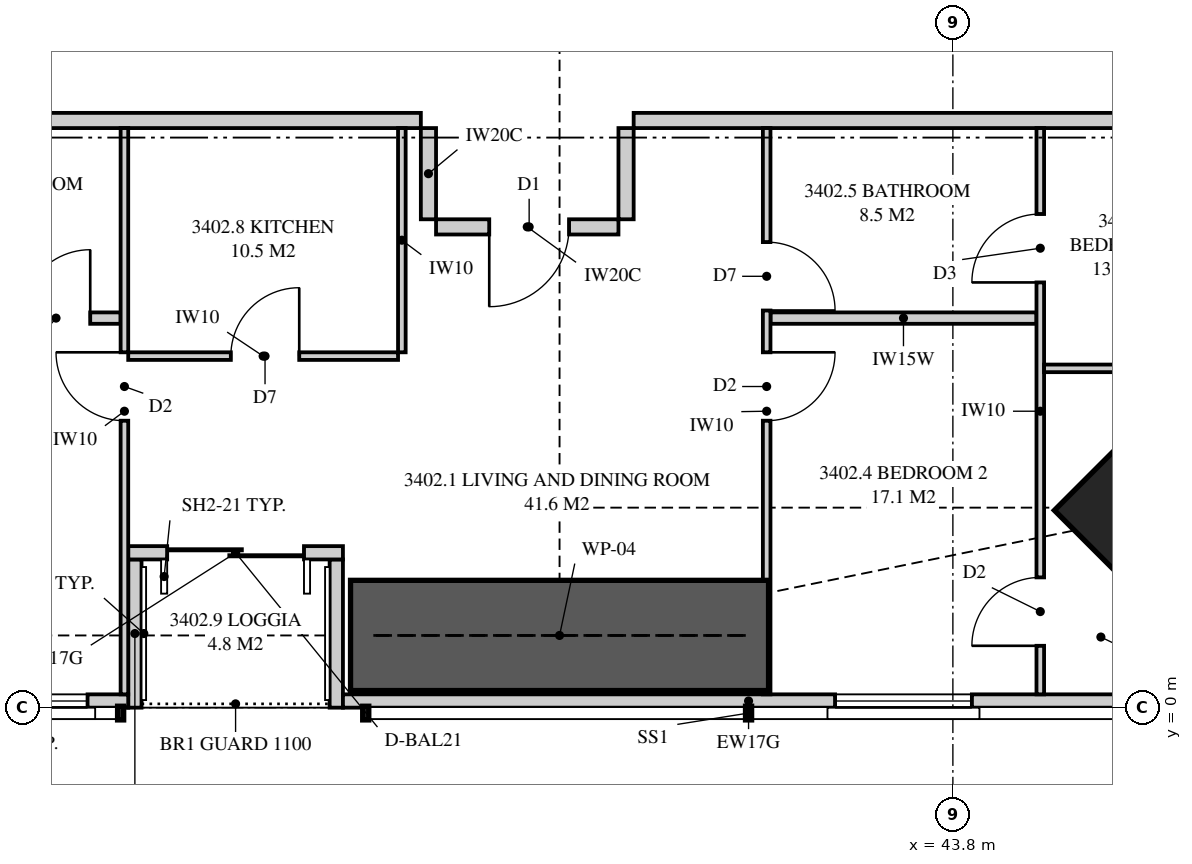
"""IFC4 building model, lengths in metres.
Left out: names, types, materials, properties, quantities, classifications, styles, units other than length and angle.
Written with IfcOpenShell. Run it as: python <this file> out.ifc"""

import sys

from ifc_helpers import new_model, si_unit, direction, frame, frame_2d, origin, origin_2d, place, context, subcontext, project, spatial, polyline, rectangle, outline, extrude, element, fill, save


model = new_model("IFC4")
c1 = context("Model", 3, precision=1e-05, world=origin(), true_north=direction((0.0, 1.0)))
c2 = subcontext(c1, "Body", "Model", "MODEL_VIEW")
j1 = project(units=[si_unit("LENGTHUNIT", "METRE"), si_unit("PLANEANGLEUNIT", "RADIAN")], contexts=[c1])
p1 = place(None, origin())
s1 = spatial("IfcSite", under=j1, at=p1, CompositionType="ELEMENT")
p2 = place(p1, origin())
s2 = spatial("IfcBuilding", under=s1, at=p2, CompositionType="ELEMENT")
p3 = place(p2, frame((0.0, 0.0, 124.95)))
s3 = spatial("IfcBuildingStorey", under=s2, at=p3, CompositionType="ELEMENT", Elevation=124.95)
p4 = place(p3, frame((46.869, 2.631, 0.0), z_axis=(0.0, 0.0, 1.0), x_axis=(-0.707106781187, 0.707106781187, 0.0)))
e1 = element("IfcColumn", 1, at=p4, inside=s3, PredefinedType="COLUMN", context=c2, shape_type="SweptSolid", body=[
    extrude(rectangle(XDim=2.4, YDim=2.5, at=origin_2d()), origin(), (0.0, 0.0, 1.0), 3.35),
])
p5 = place(p3, frame((22.55, 0.087, 0.0), z_axis=(0.0, 0.0, 1.0), x_axis=(1.0, 0.0, 0.0)))
e2 = element("IfcWall", 2, at=p5, inside=s3, PredefinedType="SOLIDWALL", context=c2, shape_type="SweptSolid", body=[
    extrude(rectangle(XDim=10.4, YDim=0.175, at=frame_2d((5.2, 0.0))), origin(), (0.0, 0.0, 1.0), 2.15),
])
p6 = place(p5, frame((0.532, 0.0, 0.4)))
e3 = element("IfcOpeningElement", 3, at=p6, cuts=e2, PredefinedType="OPENING", context=c2, shape_type="SweptSolid", body=[
    extrude(rectangle(XDim=1.8, YDim=1.7, at=frame_2d((0.9, 0.85))), frame((0.0, 0.097, 0.0), z_axis=(0.0, -1.0, 0.0), x_axis=(1.0, 0.0, 0.0)), (0.0, 0.0, 1.0), 0.195),
])
p7 = place(p5, frame((8.065, 0.0, 0.4)))
e4 = element("IfcOpeningElement", 4, at=p7, cuts=e2, PredefinedType="OPENING", context=c2, shape_type="SweptSolid", body=[
    extrude(rectangle(XDim=1.8, YDim=1.7, at=frame_2d((0.9, 0.85))), frame((0.0, 0.097, 0.0), z_axis=(0.0, -1.0, 0.0), x_axis=(1.0, 0.0, 0.0)), (0.0, 0.0, 1.0), 0.195),
])
p8 = place(p3, frame((35.775, 0.087, 0.0), z_axis=(0.0, 0.0, 1.0), x_axis=(1.0, 0.0, 0.0)))
e5 = element("IfcWall", 5, at=p8, inside=s3, PredefinedType="SOLIDWALL", context=c2, shape_type="SweptSolid", body=[
    extrude(outline(polyline([(0.0, 0.0), (10.674, 0.0), (10.674, 3.11), (3.053, 3.11), (3.053, 2.15), (3.008, 2.15), (3.008, 3.11), (2.85, 3.11), (2.85, 2.15), (0.0, 2.15), (0.0, 0.0)])), frame((0.0, 0.087, 0.0), z_axis=(0.0, -1.0, 0.0), x_axis=(1.0, 0.0, 0.0)), (0.0, 0.0, 1.0), 0.175),
])
p9 = place(p8, frame((6.475, 0.0, 0.4)))
e6 = element("IfcOpeningElement", 6, at=p9, cuts=e5, PredefinedType="OPENING", context=c2, shape_type="SweptSolid", body=[
    extrude(rectangle(XDim=1.8, YDim=1.7, at=frame_2d((0.9, 0.85))), frame((0.0, 0.097, 0.0), z_axis=(0.0, -1.0, 0.0), x_axis=(1.0, 0.0, 0.0)), (0.0, 0.0, 1.0), 0.195),
])
p10 = place(p3, frame((32.95, 2.038, 0.0), z_axis=(0.0, 0.0, 1.0), x_axis=(1.0, 0.0, 0.0)))
e7 = element("IfcWall", 7, at=p10, inside=s3, PredefinedType="SOLIDWALL", context=c2, shape_type="SweptSolid", body=[
    extrude(rectangle(XDim=2.825, YDim=0.175, at=frame_2d((1.413, 0.0))), origin(), (0.0, 0.0, 1.0), 3.11),
])
p11 = place(p10, frame((0.512, 0.0, 0.0)))
e8 = element("IfcOpeningElement", 8, at=p11, cuts=e7, PredefinedType="OPENING", context=c2, shape_type="SweptSolid", body=[
    extrude(rectangle(XDim=1.8, YDim=2.1, at=frame_2d((0.9, 1.05))), frame((0.0, 0.097, 0.0), z_axis=(0.0, -1.0, 0.0), x_axis=(1.0, 0.0, 0.0)), (0.0, 0.0, 1.0), 0.195),
])
for number, where, z_axis, x_axis in (
    (9, (33.038, 0.0, 0.0), (0.0, 0.0, 1.0), (0.0, 1.0, 0.0)),
    (10, (35.688, 0.0, 0.0), (0.0, 0.0, 1.0), (0.0, 1.0, 0.0)),
):
    element("IfcWall", number, at=place(p3, frame(where, z_axis=z_axis, x_axis=x_axis)), inside=s3, PredefinedType="SOLIDWALL", context=c2, shape_type="SweptSolid", body=[
        extrude(outline(polyline([(0.0, 0.0), (1.95, 0.0), (1.95, 3.11), (1.75, 3.11), (1.75, 2.15), (0.15, 2.15), (0.15, 3.11), (0.0, 3.11), (0.0, 0.0)])), frame((0.0, 0.087, 0.0), z_axis=(0.0, -1.0, 0.0), x_axis=(1.0, 0.0, 0.0)), (0.0, 0.0, 1.0), 0.175),
    ])
p12 = place(p3, frame((27.0, 7.725, 0.0), z_axis=(0.0, 0.0, 1.0), x_axis=(1.0, 0.0, 0.0)))
e11 = element("IfcWall", 11, at=p12, inside=s3, PredefinedType="PARTITIONING", context=c2, shape_type="SweptSolid", body=[
    extrude(outline(polyline([(0.0, 0.0), (9.8, 0.0), (9.8, 3.11), (1.087, 3.11), (1.087, 2.541), (0.413, 2.541), (0.413, 3.11), (0.0, 3.11), (0.0, 0.0)])), frame((0.0, 0.1, 0.0), z_axis=(0.0, -1.0, 0.0), x_axis=(1.0, 0.0, 0.0)), (0.0, 0.0, 1.0), 0.2),
])
p13 = place(p3, frame((32.9, 0.175, 0.0), z_axis=(0.0, 0.0, 1.0), x_axis=(0.0, 1.0, 0.0)))
e12 = element("IfcWall", 12, at=p13, inside=s3, PredefinedType="PARTITIONING", context=c2, shape_type="SweptSolid", body=[
    extrude(outline(polyline([(0.0, 0.0), (7.45, 0.0), (7.45, 3.11), (1.635, 3.11), (1.635, 2.15), (0.0, 2.15), (0.0, 3.11), (0.0, 0.0)])), frame((0.0, 0.05, 0.0), z_axis=(0.0, -1.0, 0.0), x_axis=(1.0, 0.0, 0.0)), (0.0, 0.0, 1.0), 0.1),
])
p14 = place(p13, frame((3.6, 0.0, 0.0)))
e13 = element("IfcOpeningElement", 13, at=p14, cuts=e12, PredefinedType="OPENING", context=c2, shape_type="SweptSolid", body=[
    extrude(rectangle(XDim=0.9, YDim=2.1, at=frame_2d((0.45, 1.05))), frame((0.0, 0.06, 0.0), z_axis=(0.0, -1.0, 0.0), x_axis=(1.0, 0.0, 0.0)), (0.0, 0.0, 1.0), 0.12),
])
p15 = place(p3, frame((41.35, 0.175, 0.0), z_axis=(0.0, 0.0, 1.0), x_axis=(0.0, 1.0, 0.0)))
e14 = element("IfcWall", 14, at=p15, inside=s3, PredefinedType="PARTITIONING", context=c2, shape_type="SweptSolid", body=[
    extrude(outline(polyline([(0.0, 0.0), (7.45, 0.0), (7.45, 3.11), (3.716, 3.11), (3.716, 2.51), (2.208, 2.51), (2.208, 2.15), (0.453, 2.15), (0.453, 3.11), (0.0, 3.11), (0.0, 0.0)])), frame((0.0, 0.05, 0.0), z_axis=(0.0, -1.0, 0.0), x_axis=(1.0, 0.0, 0.0)), (0.0, 0.0, 1.0), 0.1),
])
p16 = place(p15, frame((3.6, 0.0, 0.0)))
e15 = element("IfcOpeningElement", 15, at=p16, cuts=e14, PredefinedType="OPENING", context=c2, shape_type="SweptSolid", body=[
    extrude(rectangle(XDim=0.9, YDim=2.1, at=frame_2d((0.45, 1.05))), frame((0.0, 0.06, 0.0), z_axis=(0.0, -1.0, 0.0), x_axis=(1.0, 0.0, 0.0)), (0.0, 0.0, 1.0), 0.12),
])
p17 = place(p15, frame((5.05, 0.0, 0.0)))
e16 = element("IfcOpeningElement", 16, at=p17, cuts=e14, PredefinedType="OPENING", context=c2, shape_type="SweptSolid", body=[
    extrude(rectangle(XDim=0.9, YDim=2.1, at=frame_2d((0.45, 1.05))), frame((0.0, 0.06, 0.0), z_axis=(0.0, -1.0, 0.0), x_axis=(1.0, 0.0, 0.0)), (0.0, 0.0, 1.0), 0.12),
])
p18 = place(p3, frame((44.95, 0.175, 0.0), z_axis=(0.0, 0.0, 1.0), x_axis=(0.0, 1.0, 0.0)))
e17 = element("IfcWall", 17, at=p18, inside=s3, PredefinedType="PARTITIONING", context=c2, shape_type="SweptSolid", body=[
    extrude(outline(polyline([(0.0, 0.0), (7.45, 0.0), (7.45, 3.11), (3.716, 3.11), (3.716, 2.51), (2.943, 2.51), (2.943, 2.15), (1.188, 2.15), (1.188, 3.11), (0.0, 3.11), (0.0, 0.0)])), frame((0.0, 0.05, 0.0), z_axis=(0.0, -1.0, 0.0), x_axis=(1.0, 0.0, 0.0)), (0.0, 0.0, 1.0), 0.1),
])
p19 = place(p18, frame((0.639, 0.0, 0.0)))
e18 = element("IfcOpeningElement", 18, at=p19, cuts=e17, PredefinedType="OPENING", context=c2, shape_type="SweptSolid", body=[
    extrude(rectangle(XDim=0.9, YDim=2.1, at=frame_2d((0.45, 1.05))), frame((0.0, 0.06, 0.0), z_axis=(0.0, -1.0, 0.0), x_axis=(1.0, 0.0, 0.0)), (0.0, 0.0, 1.0), 0.12),
])
p20 = place(p18, frame((5.419, 0.0, 0.0)))
e19 = element("IfcOpeningElement", 19, at=p20, cuts=e17, PredefinedType="OPENING", context=c2, shape_type="SweptSolid", body=[
    extrude(rectangle(XDim=0.9, YDim=2.1, at=frame_2d((0.45, 1.05))), frame((0.0, 0.06, 0.0), z_axis=(0.0, -1.0, 0.0), x_axis=(1.0, 0.0, 0.0)), (0.0, 0.0, 1.0), 0.12),
])
p21 = place(p3, frame((27.0, 5.125, 0.0), z_axis=(0.0, 0.0, 1.0), x_axis=(1.0, 0.0, 0.0)))
e20 = element("IfcWall", 20, at=p21, inside=s3, PredefinedType="PLUMBINGWALL", context=c2, shape_type="SweptSolid", body=[
    extrude(outline(polyline([(0.0, 0.0), (5.85, 0.0), (5.85, 3.11), (1.062, 3.11), (1.062, 2.541), (0.438, 2.541), (0.438, 3.11), (0.0, 3.11), (0.0, 0.0)])), frame((0.0, 0.075, 0.0), z_axis=(0.0, -1.0, 0.0), x_axis=(1.0, 0.0, 0.0)), (0.0, 0.0, 1.0), 0.15),
])
p22 = place(p21, frame((4.55, 0.0, 0.0)))
e21 = element("IfcOpeningElement", 21, at=p22, cuts=e20, PredefinedType="OPENING", context=c2, shape_type="SweptSolid", body=[
    extrude(rectangle(XDim=0.9, YDim=2.1, at=frame_2d((0.45, 1.05))), frame((0.0, 0.085, 0.0), z_axis=(0.0, -1.0, 0.0), x_axis=(1.0, 0.0, 0.0)), (0.0, 0.0, 1.0), 0.17),
])
p23 = place(p3, frame((41.4, 5.125, 0.0), z_axis=(0.0, 0.0, 1.0), x_axis=(1.0, 0.0, 0.0)))
e22 = element("IfcWall", 22, at=p23, inside=s3, PredefinedType="PLUMBINGWALL", context=c2, shape_type="SweptSolid", body=[
    extrude(rectangle(XDim=3.5, YDim=0.15, at=frame_2d((1.75, 0.0))), origin(), (0.0, 0.0, 1.0), 3.11),
])
p24 = place(p3, frame((45.0, 4.464, 0.0), z_axis=(0.0, 0.0, 1.0), x_axis=(1.0, 0.0, 0.0)))
e23 = element("IfcWall", 23, at=p24, inside=s3, PredefinedType="PARTITIONING", context=c2, shape_type="SweptSolid", body=[
    extrude(outline(polyline([(0.0, 0.0), (4.5, 0.0), (4.5, 3.11), (3.037, 3.11), (3.037, 2.15), (1.294, 2.15), (1.294, 3.11), (0.0, 3.11), (0.0, 0.0)])), frame((0.0, 0.05, 0.0), z_axis=(0.0, -1.0, 0.0), x_axis=(1.0, 0.0, 0.0)), (0.0, 0.0, 1.0), 0.1),
])
p25 = place(p24, frame((2.9, 0.0, 0.0)))
e24 = element("IfcOpeningElement", 24, at=p25, cuts=e23, PredefinedType="OPENING", context=c2, shape_type="SweptSolid", body=[
    extrude(rectangle(XDim=0.9, YDim=2.1, at=frame_2d((0.45, 1.05))), frame((0.0, 0.06, 0.0), z_axis=(0.0, -1.0, 0.0), x_axis=(1.0, 0.0, 0.0)), (0.0, 0.0, 1.0), 0.12),
])
p26 = place(p3, frame((32.95, 4.625, 0.0), z_axis=(0.0, 0.0, 1.0), x_axis=(1.0, 0.0, 0.0)))
e25 = element("IfcWall", 25, at=p26, inside=s3, PredefinedType="PARTITIONING", context=c2, shape_type="SweptSolid", body=[
    extrude(rectangle(XDim=3.55, YDim=0.1, at=frame_2d((1.775, 0.0))), origin(), (0.0, 0.0, 1.0), 3.11),
])
p27 = place(p26, frame((1.35, 0.0, 0.0)))
e26 = element("IfcOpeningElement", 26, at=p27, cuts=e25, PredefinedType="OPENING", context=c2, shape_type="SweptSolid", body=[
    extrude(rectangle(XDim=0.9, YDim=2.1, at=frame_2d((0.45, 1.05))), frame((0.0, 0.06, 0.0), z_axis=(0.0, -1.0, 0.0), x_axis=(1.0, 0.0, 0.0)), (0.0, 0.0, 1.0), 0.12),
])
p28 = place(p3, frame((36.55, 4.675, 0.0), z_axis=(0.0, 0.0, 1.0), x_axis=(0.0, 1.0, 0.0)))
e27 = element("IfcWall", 27, at=p28, inside=s3, PredefinedType="PARTITIONING", context=c2, shape_type="SweptSolid", body=[
    extrude(rectangle(XDim=2.95, YDim=0.1, at=frame_2d((1.475, 0.0))), origin(), (0.0, 0.0, 1.0), 3.11),
])
p29 = place(p3, frame((39.6, 7.725, 0.0), z_axis=(0.0, 0.0, 1.0), x_axis=(1.0, 0.0, 0.0)))
e28 = element("IfcWall", 28, at=p29, inside=s3, PredefinedType="PARTITIONING", context=c2, shape_type="SweptSolid", body=[
    extrude(rectangle(XDim=6.425, YDim=0.2, at=frame_2d((3.212, 0.0))), origin(), (0.0, 0.0, 1.0), 3.11),
])
p30 = place(p3, frame((37.0, 6.325, 0.0), z_axis=(0.0, 0.0, 1.0), x_axis=(1.0, 0.0, 0.0)))
e29 = element("IfcWall", 29, at=p30, inside=s3, PredefinedType="PARTITIONING", context=c2, shape_type="SweptSolid", body=[
    extrude(outline(polyline([(0.0, 0.0), (2.4, 0.0), (2.4, 3.11), (1.962, 3.11), (1.962, 2.541), (1.288, 2.541), (1.288, 3.11), (0.0, 3.11), (0.0, 0.0)])), frame((0.0, 0.1, 0.0), z_axis=(0.0, -1.0, 0.0), x_axis=(1.0, 0.0, 0.0)), (0.0, 0.0, 1.0), 0.2),
])
p31 = place(p30, frame((0.7, 0.0, 0.0)))
e30 = element("IfcOpeningElement", 30, at=p31, cuts=e29, PredefinedType="OPENING", context=c2, shape_type="SweptSolid", body=[
    extrude(rectangle(XDim=1.05, YDim=2.2, at=frame_2d((0.525, 1.1))), frame((0.0, 0.11, 0.0), z_axis=(0.0, -1.0, 0.0), x_axis=(1.0, 0.0, 0.0)), (0.0, 0.0, 1.0), 0.22),
])
for number, where, z_axis, x_axis in (
    (31, (36.9, 7.625, 0.0), (0.0, 0.0, 1.0), (0.0, -1.0, 0.0)),
    (32, (39.5, 7.625, 0.0), (0.0, 0.0, 1.0), (0.0, -1.0, 0.0)),
):
    element("IfcWall", number, at=place(p3, frame(where, z_axis=z_axis, x_axis=x_axis)), inside=s3, PredefinedType="PARTITIONING", context=c2, shape_type="SweptSolid", body=[
        extrude(rectangle(XDim=1.2, YDim=0.2, at=frame_2d((0.6, 0.0))), origin(), (0.0, 0.0, 1.0), 3.11),
    ])
p32 = place(p3, frame((35.875, 0.95, 0.0), z_axis=(0.0, 0.0, 1.0), x_axis=(1.0, 0.0, 0.0)))
e33 = element("IfcWall", 33, at=p32, inside=s3, PredefinedType="SHEAR", context=c2, shape_type="SweptSolid", body=[
    extrude(rectangle(XDim=5.5, YDim=1.45, at=frame_2d((2.75, 0.0))), origin(), (0.0, 0.0, 1.0), 3.35),
])
p33 = place(p7, origin())
e34 = element("IfcWindow", 34, at=p33, inside=s3, PartitioningType="SINGLE_PANEL", PredefinedType="WINDOW", context=c2, shape_type="SweptSolid", body=[
    extrude(rectangle(XDim=1.8, YDim=1.7, at=frame_2d((0.9, 0.85))), frame((0.0, 0.03, 0.0), z_axis=(0.0, -1.0, 0.0), x_axis=(1.0, 0.0, 0.0)), (0.0, 0.0, 1.0), 0.06),
])
fill(e4, e34)
p34 = place(p11, origin())
e35 = element("IfcDoor", 35, at=p34, inside=s3, OperationType="SLIDING_TO_LEFT", PredefinedType="DOOR", context=c2, shape_type="SweptSolid", body=[
    extrude(rectangle(XDim=1.8, YDim=2.1, at=frame_2d((0.9, 1.05))), frame((0.0, 0.025, 0.0), z_axis=(0.0, -1.0, 0.0), x_axis=(1.0, 0.0, 0.0)), (0.0, 0.0, 1.0), 0.05),
])
fill(e8, e35)
p35 = place(p9, origin())
e36 = element("IfcWindow", 36, at=p35, inside=s3, PartitioningType="SINGLE_PANEL", PredefinedType="WINDOW", context=c2, shape_type="SweptSolid", body=[
    extrude(rectangle(XDim=1.8, YDim=1.7, at=frame_2d((0.9, 0.85))), frame((0.0, 0.03, 0.0), z_axis=(0.0, -1.0, 0.0), x_axis=(1.0, 0.0, 0.0)), (0.0, 0.0, 1.0), 0.06),
])
fill(e6, e36)
p36 = place(p31, frame((1.05, 0.0, 0.0), z_axis=(0.0, 0.0, 1.0), x_axis=(-1.0, 0.0, 0.0)))
e37 = element("IfcDoor", 37, at=p36, inside=s3, OperationType="SINGLE_SWING_RIGHT", PredefinedType="DOOR", context=c2, shape_type="SweptSolid", body=[
    extrude(rectangle(XDim=1.05, YDim=2.2, at=frame_2d((0.525, 1.1))), frame((0.0, 0.025, 0.0), z_axis=(0.0, -1.0, 0.0), x_axis=(1.0, 0.0, 0.0)), (0.0, 0.0, 1.0), 0.05),
])
fill(e30, e37)
p37 = place(p14, origin())
e38 = element("IfcDoor", 38, at=p37, inside=s3, OperationType="SINGLE_SWING_RIGHT", PredefinedType="DOOR", context=c2, shape_type="SweptSolid", body=[
    extrude(rectangle(XDim=0.9, YDim=2.1, at=frame_2d((0.45, 1.05))), frame((0.0, 0.025, 0.0), z_axis=(0.0, -1.0, 0.0), x_axis=(1.0, 0.0, 0.0)), (0.0, 0.0, 1.0), 0.05),
])
fill(e13, e38)
p38 = place(p22, origin())
e39 = element("IfcDoor", 39, at=p38, inside=s3, OperationType="SINGLE_SWING_RIGHT", PredefinedType="DOOR", context=c2, shape_type="SweptSolid", body=[
    extrude(rectangle(XDim=0.9, YDim=2.1, at=frame_2d((0.45, 1.05))), frame((0.0, 0.025, 0.0), z_axis=(0.0, -1.0, 0.0), x_axis=(1.0, 0.0, 0.0)), (0.0, 0.0, 1.0), 0.05),
])
fill(e21, e39)
p39 = place(p16, frame((0.9, 0.0, 0.0), z_axis=(0.0, 0.0, 1.0), x_axis=(-1.0, 0.0, 0.0)))
e40 = element("IfcDoor", 40, at=p39, inside=s3, OperationType="SINGLE_SWING_LEFT", PredefinedType="DOOR", context=c2, shape_type="SweptSolid", body=[
    extrude(rectangle(XDim=0.9, YDim=2.1, at=frame_2d((0.45, 1.05))), frame((0.0, 0.025, 0.0), z_axis=(0.0, -1.0, 0.0), x_axis=(1.0, 0.0, 0.0)), (0.0, 0.0, 1.0), 0.05),
])
fill(e15, e40)
p40 = place(p17, frame((0.9, 0.0, 0.0), z_axis=(0.0, 0.0, 1.0), x_axis=(-1.0, 0.0, 0.0)))
e41 = element("IfcDoor", 41, at=p40, inside=s3, OperationType="SINGLE_SWING_RIGHT", PredefinedType="DOOR", context=c2, shape_type="SweptSolid", body=[
    extrude(rectangle(XDim=0.9, YDim=2.1, at=frame_2d((0.45, 1.05))), frame((0.0, 0.025, 0.0), z_axis=(0.0, -1.0, 0.0), x_axis=(1.0, 0.0, 0.0)), (0.0, 0.0, 1.0), 0.05),
])
fill(e16, e41)
p41 = place(p19, origin())
e42 = element("IfcDoor", 42, at=p41, inside=s3, OperationType="SINGLE_SWING_LEFT", PredefinedType="DOOR", context=c2, shape_type="SweptSolid", body=[
    extrude(rectangle(XDim=0.9, YDim=2.1, at=frame_2d((0.45, 1.05))), frame((0.0, 0.025, 0.0), z_axis=(0.0, -1.0, 0.0), x_axis=(1.0, 0.0, 0.0)), (0.0, 0.0, 1.0), 0.05),
])
fill(e18, e42)
p42 = place(p20, origin())
e43 = element("IfcDoor", 43, at=p42, inside=s3, OperationType="SINGLE_SWING_LEFT", PredefinedType="DOOR", context=c2, shape_type="SweptSolid", body=[
    extrude(rectangle(XDim=0.9, YDim=2.1, at=frame_2d((0.45, 1.05))), frame((0.0, 0.025, 0.0), z_axis=(0.0, -1.0, 0.0), x_axis=(1.0, 0.0, 0.0)), (0.0, 0.0, 1.0), 0.05),
])
fill(e19, e43)
p43 = place(p27, origin())
e44 = element("IfcDoor", 44, at=p43, inside=s3, OperationType="SINGLE_SWING_RIGHT", PredefinedType="DOOR", context=c2, shape_type="SweptSolid", body=[
    extrude(rectangle(XDim=0.9, YDim=2.1, at=frame_2d((0.45, 1.05))), frame((0.0, 0.025, 0.0), z_axis=(0.0, -1.0, 0.0), x_axis=(1.0, 0.0, 0.0)), (0.0, 0.0, 1.0), 0.05),
])
fill(e26, e44)
save(model, sys.argv[1])
